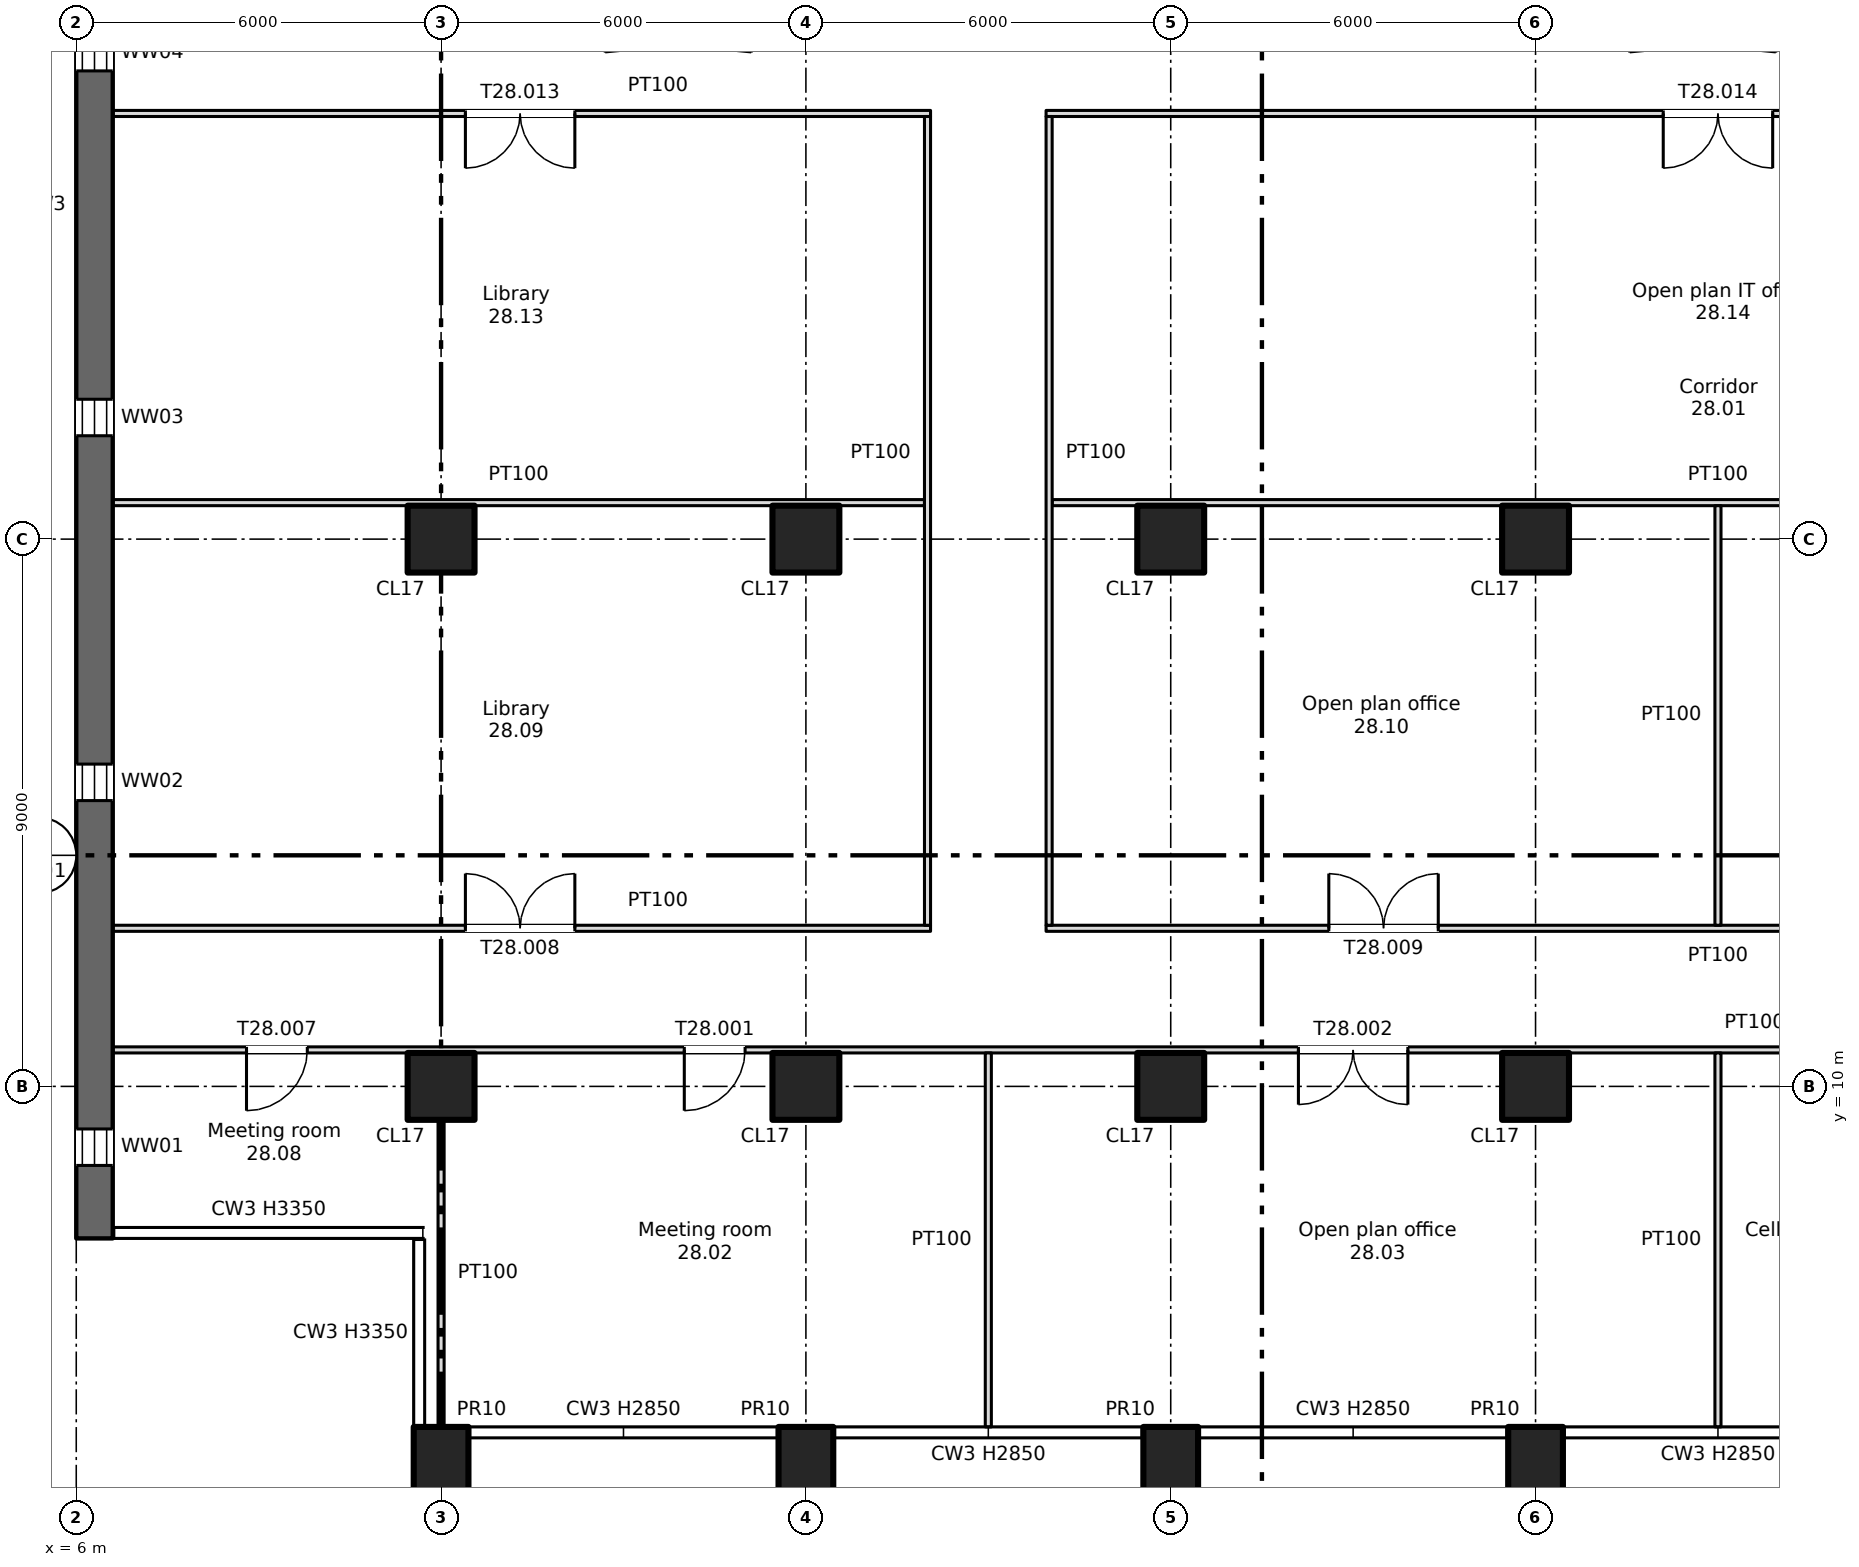
"""IFC4 building model, lengths in metres.
Left out: names, types, materials, properties, quantities, classifications, styles, units other than length and angle.
Written with IfcOpenShell. Run it as: python <this file> out.ifc"""

import sys

from ifc_helpers import new_model, si_unit, direction, frame, frame_2d, origin, origin_2d, place, context, subcontext, project, spatial, rectangle, extrude, element, fill, save


model = new_model("IFC4")
c1 = context("Model", 3, precision=1e-05, world=origin(), true_north=direction((0.0, 1.0)))
c2 = subcontext(c1, "Body", "Model", "MODEL_VIEW")
j1 = project(units=[si_unit("LENGTHUNIT", "METRE"), si_unit("PLANEANGLEUNIT", "RADIAN")], contexts=[c1])
p1 = place(None, origin())
s1 = spatial("IfcSite", under=j1, at=p1, CompositionType="ELEMENT")
p2 = place(p1, origin())
s2 = spatial("IfcBuilding", under=s1, at=p2, CompositionType="ELEMENT")
p3 = place(p2, frame((0.0, 0.0, 193.0)))
s3 = spatial("IfcBuildingStorey", under=s2, at=p3, CompositionType="ELEMENT", Elevation=193.0)
for number, where, z_axis, x_axis in (
    (1, (12.0, 3.7, -0.4), (0.0, 0.0, 1.0), (1.0, 0.0, 0.0)),
    (2, (18.0, 3.7, -0.4), (0.0, 0.0, 1.0), (1.0, 0.0, 0.0)),
    (3, (24.0, 3.7, -0.4), (0.0, 0.0, 1.0), (1.0, 0.0, 0.0)),
    (4, (30.0, 3.7, -0.4), (0.0, 0.0, 1.0), (1.0, 0.0, 0.0)),
):
    element("IfcColumn", number, at=place(p3, frame(where, z_axis=z_axis, x_axis=x_axis)), inside=s3, PredefinedType="COLUMN", context=c2, shape_type="SweptSolid", body=[
        extrude(rectangle(XDim=0.9, YDim=1.4, at=origin_2d()), origin(), (0.0, 0.0, 1.0), 3.75),
    ])
for number, where, z_axis, x_axis in (
    (5, (12.0, 10.0, 0.0), (0.0, 0.0, 1.0), (1.0, 0.0, 0.0)),
    (6, (12.0, 19.0, 0.0), (0.0, 0.0, 1.0), (1.0, 0.0, 0.0)),
    (7, (18.0, 10.0, 0.0), (0.0, 0.0, 1.0), (1.0, 0.0, 0.0)),
    (8, (18.0, 19.0, 0.0), (0.0, 0.0, 1.0), (1.0, 0.0, 0.0)),
    (9, (24.0, 10.0, 0.0), (0.0, 0.0, 1.0), (1.0, 0.0, 0.0)),
    (10, (24.0, 19.0, 0.0), (0.0, 0.0, 1.0), (1.0, 0.0, 0.0)),
    (11, (30.0, 10.0, 0.0), (0.0, 0.0, 1.0), (1.0, 0.0, 0.0)),
    (12, (30.0, 19.0, 0.0), (0.0, 0.0, 1.0), (1.0, 0.0, 0.0)),
):
    element("IfcColumn", number, at=place(p3, frame(where, z_axis=z_axis, x_axis=x_axis)), inside=s3, PredefinedType="COLUMN", context=c2, shape_type="SweptSolid", body=[
        extrude(rectangle(XDim=1.1, YDim=1.1, at=origin_2d()), origin(), (0.0, 0.0, 1.0), 3.35),
    ])
p4 = place(p3, frame((6.3, 7.5, 0.0), z_axis=(0.0, 0.0, 1.0), x_axis=(0.0, 1.0, 0.0)))
e13 = element("IfcWall", 13, at=p4, inside=s3, PredefinedType="SHEAR", context=c2, shape_type="SweptSolid", body=[
    extrude(rectangle(XDim=34.0, YDim=0.6, at=frame_2d((17.0, 0.0))), origin(), (0.0, 0.0, 1.0), 3.35),
])
p5 = place(p4, frame((1.2, 0.0, 0.6)))
e14 = element("IfcOpeningElement", 14, at=p5, cuts=e13, PredefinedType="OPENING", context=c2, shape_type="SweptSolid", body=[
    extrude(rectangle(XDim=0.6, YDim=2.4, at=frame_2d((0.3, 1.2))), frame((0.0, 0.31, 0.0), z_axis=(0.0, -1.0, 0.0), x_axis=(1.0, 0.0, 0.0)), (0.0, 0.0, 1.0), 0.62),
])
p6 = place(p4, frame((7.2, 0.0, 0.6)))
e15 = element("IfcOpeningElement", 15, at=p6, cuts=e13, PredefinedType="OPENING", context=c2, shape_type="SweptSolid", body=[
    extrude(rectangle(XDim=0.6, YDim=2.4, at=frame_2d((0.3, 1.2))), frame((0.0, 0.31, 0.0), z_axis=(0.0, -1.0, 0.0), x_axis=(1.0, 0.0, 0.0)), (0.0, 0.0, 1.0), 0.62),
])
p7 = place(p4, frame((13.2, 0.0, 0.6)))
e16 = element("IfcOpeningElement", 16, at=p7, cuts=e13, PredefinedType="OPENING", context=c2, shape_type="SweptSolid", body=[
    extrude(rectangle(XDim=0.6, YDim=2.4, at=frame_2d((0.3, 1.2))), frame((0.0, 0.31, 0.0), z_axis=(0.0, -1.0, 0.0), x_axis=(1.0, 0.0, 0.0)), (0.0, 0.0, 1.0), 0.62),
])
p8 = place(p4, frame((19.2, 0.0, 0.6)))
e17 = element("IfcOpeningElement", 17, at=p8, cuts=e13, PredefinedType="OPENING", context=c2, shape_type="SweptSolid", body=[
    extrude(rectangle(XDim=0.6, YDim=2.4, at=frame_2d((0.3, 1.2))), frame((0.0, 0.31, 0.0), z_axis=(0.0, -1.0, 0.0), x_axis=(1.0, 0.0, 0.0)), (0.0, 0.0, 1.0), 0.62),
])
p9 = place(p3, frame((6.6, 10.6, 0.0), z_axis=(0.0, 0.0, 1.0), x_axis=(1.0, 0.0, 0.0)))
e18 = element("IfcWall", 18, at=p9, inside=s3, PredefinedType="PARTITIONING", context=c2, shape_type="SweptSolid", body=[
    extrude(rectangle(XDim=64.8, YDim=0.1, at=frame_2d((32.4, 0.0))), origin(), (0.0, 0.0, 1.0), 3.35),
])
p10 = place(p9, frame((9.4, 0.0, 0.0)))
e19 = element("IfcOpeningElement", 19, at=p10, cuts=e18, PredefinedType="OPENING", context=c2, shape_type="SweptSolid", body=[
    extrude(rectangle(XDim=1.0, YDim=2.1, at=frame_2d((0.5, 1.05))), frame((0.0, 0.06, 0.0), z_axis=(0.0, -1.0, 0.0), x_axis=(1.0, 0.0, 0.0)), (0.0, 0.0, 1.0), 0.12),
])
p11 = place(p9, frame((19.5, 0.0, 0.0)))
e20 = element("IfcOpeningElement", 20, at=p11, cuts=e18, PredefinedType="OPENING", context=c2, shape_type="SweptSolid", body=[
    extrude(rectangle(XDim=1.8, YDim=2.1, at=frame_2d((0.9, 1.05))), frame((0.0, 0.06, 0.0), z_axis=(0.0, -1.0, 0.0), x_axis=(1.0, 0.0, 0.0)), (0.0, 0.0, 1.0), 0.12),
])
p12 = place(p9, frame((30.15, 0.0, 0.0)))
e21 = element("IfcOpeningElement", 21, at=p12, cuts=e18, PredefinedType="OPENING", context=c2, shape_type="SweptSolid", body=[
    extrude(rectangle(XDim=1.0, YDim=2.1, at=frame_2d((0.5, 1.05))), frame((0.0, 0.06, 0.0), z_axis=(0.0, -1.0, 0.0), x_axis=(1.0, 0.0, 0.0)), (0.0, 0.0, 1.0), 0.12),
])
p13 = place(p9, frame((37.5, 0.0, 0.0)))
e22 = element("IfcOpeningElement", 22, at=p13, cuts=e18, PredefinedType="OPENING", context=c2, shape_type="SweptSolid", body=[
    extrude(rectangle(XDim=1.8, YDim=2.1, at=frame_2d((0.9, 1.05))), frame((0.0, 0.06, 0.0), z_axis=(0.0, -1.0, 0.0), x_axis=(1.0, 0.0, 0.0)), (0.0, 0.0, 1.0), 0.12),
])
p14 = place(p9, frame((49.5, 0.0, 0.0)))
e23 = element("IfcOpeningElement", 23, at=p14, cuts=e18, PredefinedType="OPENING", context=c2, shape_type="SweptSolid", body=[
    extrude(rectangle(XDim=1.8, YDim=2.1, at=frame_2d((0.9, 1.05))), frame((0.0, 0.06, 0.0), z_axis=(0.0, -1.0, 0.0), x_axis=(1.0, 0.0, 0.0)), (0.0, 0.0, 1.0), 0.12),
])
p15 = place(p9, frame((60.1, 0.0, 0.0)))
e24 = element("IfcOpeningElement", 24, at=p15, cuts=e18, PredefinedType="OPENING", context=c2, shape_type="SweptSolid", body=[
    extrude(rectangle(XDim=1.0, YDim=2.1, at=frame_2d((0.5, 1.05))), frame((0.0, 0.06, 0.0), z_axis=(0.0, -1.0, 0.0), x_axis=(1.0, 0.0, 0.0)), (0.0, 0.0, 1.0), 0.12),
])
p16 = place(p9, frame((2.2, 0.0, 0.0)))
e25 = element("IfcOpeningElement", 25, at=p16, cuts=e18, PredefinedType="OPENING", context=c2, shape_type="SweptSolid", body=[
    extrude(rectangle(XDim=1.0, YDim=2.1, at=frame_2d((0.5, 1.05))), frame((0.0, 0.06, 0.0), z_axis=(0.0, -1.0, 0.0), x_axis=(1.0, 0.0, 0.0)), (0.0, 0.0, 1.0), 0.12),
])
p17 = place(p3, frame((6.6, 12.6, 0.0), z_axis=(0.0, 0.0, 1.0), x_axis=(1.0, 0.0, 0.0)))
e26 = element("IfcWall", 26, at=p17, inside=s3, PredefinedType="PARTITIONING", context=c2, shape_type="SweptSolid", body=[
    extrude(rectangle(XDim=13.45, YDim=0.1, at=frame_2d((6.725, 0.0))), origin(), (0.0, 0.0, 1.0), 3.35),
])
p18 = place(p17, frame((5.8, 0.0, 0.0)))
e27 = element("IfcOpeningElement", 27, at=p18, cuts=e26, PredefinedType="OPENING", context=c2, shape_type="SweptSolid", body=[
    extrude(rectangle(XDim=1.8, YDim=2.1, at=frame_2d((0.9, 1.05))), frame((0.0, 0.06, 0.0), z_axis=(0.0, -1.0, 0.0), x_axis=(1.0, 0.0, 0.0)), (0.0, 0.0, 1.0), 0.12),
])
p19 = place(p3, frame((21.95, 12.6, 0.0), z_axis=(0.0, 0.0, 1.0), x_axis=(1.0, 0.0, 0.0)))
e28 = element("IfcWall", 28, at=p19, inside=s3, PredefinedType="PARTITIONING", context=c2, shape_type="SweptSolid", body=[
    extrude(rectangle(XDim=22.1, YDim=0.1, at=frame_2d((11.05, 0.0))), origin(), (0.0, 0.0, 1.0), 3.35),
])
p20 = place(p19, frame((4.65, 0.0, 0.0)))
e29 = element("IfcOpeningElement", 29, at=p20, cuts=e28, PredefinedType="OPENING", context=c2, shape_type="SweptSolid", body=[
    extrude(rectangle(XDim=1.8, YDim=2.1, at=frame_2d((0.9, 1.05))), frame((0.0, 0.06, 0.0), z_axis=(0.0, -1.0, 0.0), x_axis=(1.0, 0.0, 0.0)), (0.0, 0.0, 1.0), 0.12),
])
p21 = place(p19, frame((15.65, 0.0, 0.0)))
e30 = element("IfcOpeningElement", 30, at=p21, cuts=e28, PredefinedType="OPENING", context=c2, shape_type="SweptSolid", body=[
    extrude(rectangle(XDim=1.8, YDim=2.1, at=frame_2d((0.9, 1.05))), frame((0.0, 0.06, 0.0), z_axis=(0.0, -1.0, 0.0), x_axis=(1.0, 0.0, 0.0)), (0.0, 0.0, 1.0), 0.12),
])
p22 = place(p3, frame((6.6, 19.6, 0.0), z_axis=(0.0, 0.0, 1.0), x_axis=(1.0, 0.0, 0.0)))
e31 = element("IfcWall", 31, at=p22, inside=s3, PredefinedType="PARTITIONING", context=c2, shape_type="SweptSolid", body=[
    extrude(rectangle(XDim=13.35, YDim=0.1, at=frame_2d((6.675, 0.0))), origin(), (0.0, 0.0, 1.0), 3.35),
])
p23 = place(p3, frame((22.05, 19.6, 0.0), z_axis=(0.0, 0.0, 1.0), x_axis=(1.0, 0.0, 0.0)))
e32 = element("IfcWall", 32, at=p23, inside=s3, PredefinedType="PARTITIONING", context=c2, shape_type="SweptSolid", body=[
    extrude(rectangle(XDim=21.9, YDim=0.1, at=frame_2d((10.95, 0.0))), origin(), (0.0, 0.0, 1.0), 3.35),
])
p24 = place(p3, frame((6.6, 26.0, 0.0), z_axis=(0.0, 0.0, 1.0), x_axis=(1.0, 0.0, 0.0)))
e33 = element("IfcWall", 33, at=p24, inside=s3, PredefinedType="PARTITIONING", context=c2, shape_type="SweptSolid", body=[
    extrude(rectangle(XDim=13.45, YDim=0.1, at=frame_2d((6.725, 0.0))), origin(), (0.0, 0.0, 1.0), 3.35),
])
p25 = place(p24, frame((5.8, 0.0, 0.0)))
e34 = element("IfcOpeningElement", 34, at=p25, cuts=e33, PredefinedType="OPENING", context=c2, shape_type="SweptSolid", body=[
    extrude(rectangle(XDim=1.8, YDim=2.1, at=frame_2d((0.9, 1.05))), frame((0.0, 0.06, 0.0), z_axis=(0.0, -1.0, 0.0), x_axis=(1.0, 0.0, 0.0)), (0.0, 0.0, 1.0), 0.12),
])
p26 = place(p3, frame((21.95, 26.0, 0.0), z_axis=(0.0, 0.0, 1.0), x_axis=(1.0, 0.0, 0.0)))
e35 = element("IfcWall", 35, at=p26, inside=s3, PredefinedType="PARTITIONING", context=c2, shape_type="SweptSolid", body=[
    extrude(rectangle(XDim=22.1, YDim=0.1, at=frame_2d((11.05, 0.0))), origin(), (0.0, 0.0, 1.0), 3.35),
])
p27 = place(p26, frame((10.15, 0.0, 0.0)))
e36 = element("IfcOpeningElement", 36, at=p27, cuts=e35, PredefinedType="OPENING", context=c2, shape_type="SweptSolid", body=[
    extrude(rectangle(XDim=1.8, YDim=2.1, at=frame_2d((0.9, 1.05))), frame((0.0, 0.06, 0.0), z_axis=(0.0, -1.0, 0.0), x_axis=(1.0, 0.0, 0.0)), (0.0, 0.0, 1.0), 0.12),
])
p28 = place(p3, frame((12.0, 4.4, 0.0), z_axis=(0.0, 0.0, 1.0), x_axis=(0.0, 1.0, 0.0)))
e37 = element("IfcWall", 37, at=p28, inside=s3, PredefinedType="PARTITIONING", context=c2, shape_type="SweptSolid", body=[
    extrude(rectangle(XDim=5.05, YDim=0.1, at=frame_2d((2.525, 0.0))), origin(), (0.0, 0.0, 1.0), 3.35),
])
p29 = place(p3, frame((20.0, 12.65, 0.0), z_axis=(0.0, 0.0, 1.0), x_axis=(0.0, 1.0, 0.0)))
e38 = element("IfcWall", 38, at=p29, inside=s3, PredefinedType="PARTITIONING", context=c2, shape_type="SweptSolid", body=[
    extrude(rectangle(XDim=13.3, YDim=0.1, at=frame_2d((6.65, 0.0))), origin(), (0.0, 0.0, 1.0), 3.35),
])
p30 = place(p3, frame((21.0, 4.4, 0.0), z_axis=(0.0, 0.0, 1.0), x_axis=(0.0, 1.0, 0.0)))
e39 = element("IfcWall", 39, at=p30, inside=s3, PredefinedType="PARTITIONING", context=c2, shape_type="SweptSolid", body=[
    extrude(rectangle(XDim=6.15, YDim=0.1, at=frame_2d((3.075, 0.0))), origin(), (0.0, 0.0, 1.0), 3.35),
])
p31 = place(p3, frame((22.0, 12.65, 0.0), z_axis=(0.0, 0.0, 1.0), x_axis=(0.0, 1.0, 0.0)))
e40 = element("IfcWall", 40, at=p31, inside=s3, PredefinedType="PARTITIONING", context=c2, shape_type="SweptSolid", body=[
    extrude(rectangle(XDim=13.3, YDim=0.1, at=frame_2d((6.65, 0.0))), origin(), (0.0, 0.0, 1.0), 3.35),
])
p32 = place(p3, frame((33.0, 4.4, 0.0), z_axis=(0.0, 0.0, 1.0), x_axis=(0.0, 1.0, 0.0)))
e41 = element("IfcWall", 41, at=p32, inside=s3, PredefinedType="PARTITIONING", context=c2, shape_type="SweptSolid", body=[
    extrude(rectangle(XDim=6.15, YDim=0.1, at=frame_2d((3.075, 0.0))), origin(), (0.0, 0.0, 1.0), 3.35),
])
p33 = place(p3, frame((33.0, 12.65, 0.0), z_axis=(0.0, 0.0, 1.0), x_axis=(0.0, 1.0, 0.0)))
e42 = element("IfcWall", 42, at=p33, inside=s3, PredefinedType="PARTITIONING", context=c2, shape_type="SweptSolid", body=[
    extrude(rectangle(XDim=6.9, YDim=0.1, at=frame_2d((3.45, 0.0))), origin(), (0.0, 0.0, 1.0), 3.35),
])
p34 = place(p5, origin())
e43 = element("IfcWindow", 43, at=p34, inside=s3, PartitioningType="SINGLE_PANEL", PredefinedType="WINDOW", context=c2, shape_type="SweptSolid", body=[
    extrude(rectangle(XDim=0.6, YDim=2.4, at=frame_2d((0.3, 1.2))), frame((0.0, 0.03, 0.0), z_axis=(0.0, -1.0, 0.0), x_axis=(1.0, 0.0, 0.0)), (0.0, 0.0, 1.0), 0.06),
])
fill(e14, e43)
p35 = place(p6, origin())
e44 = element("IfcWindow", 44, at=p35, inside=s3, PartitioningType="SINGLE_PANEL", PredefinedType="WINDOW", context=c2, shape_type="SweptSolid", body=[
    extrude(rectangle(XDim=0.6, YDim=2.4, at=frame_2d((0.3, 1.2))), frame((0.0, 0.03, 0.0), z_axis=(0.0, -1.0, 0.0), x_axis=(1.0, 0.0, 0.0)), (0.0, 0.0, 1.0), 0.06),
])
fill(e15, e44)
p36 = place(p7, origin())
e45 = element("IfcWindow", 45, at=p36, inside=s3, PartitioningType="SINGLE_PANEL", PredefinedType="WINDOW", context=c2, shape_type="SweptSolid", body=[
    extrude(rectangle(XDim=0.6, YDim=2.4, at=frame_2d((0.3, 1.2))), frame((0.0, 0.03, 0.0), z_axis=(0.0, -1.0, 0.0), x_axis=(1.0, 0.0, 0.0)), (0.0, 0.0, 1.0), 0.06),
])
fill(e16, e45)
p37 = place(p8, origin())
e46 = element("IfcWindow", 46, at=p37, inside=s3, PartitioningType="SINGLE_PANEL", PredefinedType="WINDOW", context=c2, shape_type="SweptSolid", body=[
    extrude(rectangle(XDim=0.6, YDim=2.4, at=frame_2d((0.3, 1.2))), frame((0.0, 0.03, 0.0), z_axis=(0.0, -1.0, 0.0), x_axis=(1.0, 0.0, 0.0)), (0.0, 0.0, 1.0), 0.06),
])
fill(e17, e46)
p38 = place(p10, origin())
e47 = element("IfcDoor", 47, at=p38, inside=s3, OperationType="SINGLE_SWING_LEFT", PredefinedType="DOOR", context=c2, shape_type="SweptSolid", body=[
    extrude(rectangle(XDim=1.0, YDim=2.1, at=frame_2d((0.5, 1.05))), frame((0.0, 0.025, 0.0), z_axis=(0.0, -1.0, 0.0), x_axis=(1.0, 0.0, 0.0)), (0.0, 0.0, 1.0), 0.05),
])
fill(e19, e47)
p39 = place(p11, origin())
e48 = element("IfcDoor", 48, at=p39, inside=s3, OperationType="DOUBLE_DOOR_SINGLE_SWING", PredefinedType="DOOR", context=c2, shape_type="SweptSolid", body=[
    extrude(rectangle(XDim=1.8, YDim=2.1, at=frame_2d((0.9, 1.05))), frame((0.0, 0.025, 0.0), z_axis=(0.0, -1.0, 0.0), x_axis=(1.0, 0.0, 0.0)), (0.0, 0.0, 1.0), 0.05),
])
fill(e20, e48)
p40 = place(p16, origin())
e49 = element("IfcDoor", 49, at=p40, inside=s3, OperationType="SINGLE_SWING_LEFT", PredefinedType="DOOR", context=c2, shape_type="SweptSolid", body=[
    extrude(rectangle(XDim=1.0, YDim=2.1, at=frame_2d((0.5, 1.05))), frame((0.0, 0.025, 0.0), z_axis=(0.0, -1.0, 0.0), x_axis=(1.0, 0.0, 0.0)), (0.0, 0.0, 1.0), 0.05),
])
fill(e25, e49)
p41 = place(p18, origin())
e50 = element("IfcDoor", 50, at=p41, inside=s3, OperationType="DOUBLE_DOOR_SINGLE_SWING", PredefinedType="DOOR", context=c2, shape_type="SweptSolid", body=[
    extrude(rectangle(XDim=1.8, YDim=2.1, at=frame_2d((0.9, 1.05))), frame((0.0, 0.025, 0.0), z_axis=(0.0, -1.0, 0.0), x_axis=(1.0, 0.0, 0.0)), (0.0, 0.0, 1.0), 0.05),
])
fill(e27, e50)
p42 = place(p20, origin())
e51 = element("IfcDoor", 51, at=p42, inside=s3, OperationType="DOUBLE_DOOR_SINGLE_SWING", PredefinedType="DOOR", context=c2, shape_type="SweptSolid", body=[
    extrude(rectangle(XDim=1.8, YDim=2.1, at=frame_2d((0.9, 1.05))), frame((0.0, 0.025, 0.0), z_axis=(0.0, -1.0, 0.0), x_axis=(1.0, 0.0, 0.0)), (0.0, 0.0, 1.0), 0.05),
])
fill(e29, e51)
p43 = place(p25, origin())
e52 = element("IfcDoor", 52, at=p43, inside=s3, OperationType="DOUBLE_DOOR_SINGLE_SWING", PredefinedType="DOOR", context=c2, shape_type="SweptSolid", body=[
    extrude(rectangle(XDim=1.8, YDim=2.1, at=frame_2d((0.9, 1.05))), frame((0.0, 0.025, 0.0), z_axis=(0.0, -1.0, 0.0), x_axis=(1.0, 0.0, 0.0)), (0.0, 0.0, 1.0), 0.05),
])
fill(e34, e52)
p44 = place(p27, origin())
e53 = element("IfcDoor", 53, at=p44, inside=s3, OperationType="DOUBLE_DOOR_SINGLE_SWING", PredefinedType="DOOR", context=c2, shape_type="SweptSolid", body=[
    extrude(rectangle(XDim=1.8, YDim=2.1, at=frame_2d((0.9, 1.05))), frame((0.0, 0.025, 0.0), z_axis=(0.0, -1.0, 0.0), x_axis=(1.0, 0.0, 0.0)), (0.0, 0.0, 1.0), 0.05),
])
fill(e36, e53)
save(model, sys.argv[1])
